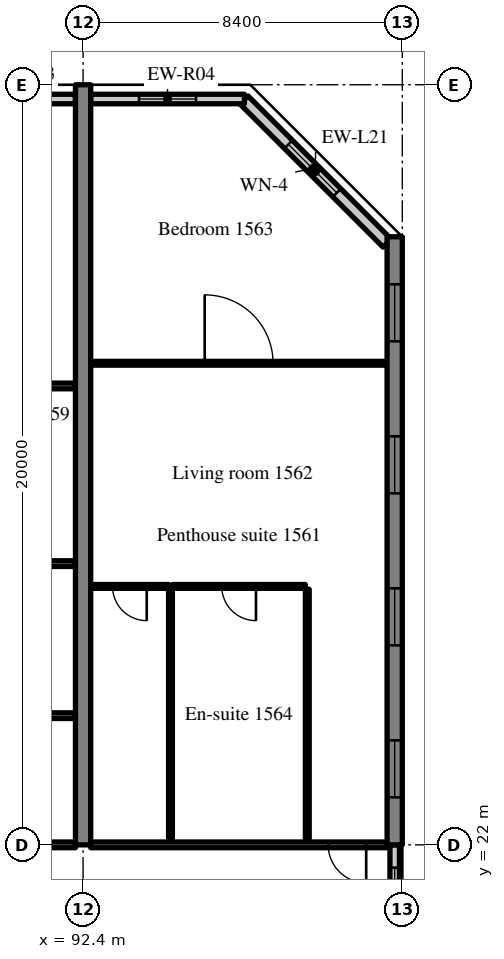
"""IFC4 building model, lengths in metres.
Left out: names, types, materials, properties, quantities, classifications, styles, units other than length and angle.
Written with IfcOpenShell. Run it as: python <this file> out.ifc"""

import sys

from ifc_helpers import new_model, si_unit, direction, frame, frame_2d, origin, place, context, subcontext, project, spatial, rectangle, extrude, source, transform, mapped, element, fill, save


model = new_model("IFC4")
c1 = context("Model", 3, precision=1e-05, world=origin(), true_north=direction((0.0, 1.0)))
c2 = subcontext(c1, "Body", "Model", "MODEL_VIEW")
j1 = project(units=[si_unit("LENGTHUNIT", "METRE"), si_unit("PLANEANGLEUNIT", "RADIAN")], contexts=[c1])
p1 = place(None, origin())
s1 = spatial("IfcSite", under=j1, at=p1, CompositionType="ELEMENT")
p2 = place(p1, origin())
s2 = spatial("IfcBuilding", under=s1, at=p2, CompositionType="ELEMENT")
p3 = place(p2, frame((0.0, 0.0, 65.8)))
s3 = spatial("IfcBuildingStorey", under=s2, at=p3, CompositionType="ELEMENT", Elevation=65.8)
m1 = source(origin(), c2, "Body", "SweptSolid", [
    extrude(rectangle(XDim=20.0, YDim=0.4, at=frame_2d((10.0, 0.0))), origin(), (0.0, 0.0, 1.0), 3.52),
])
p4 = place(p3, frame((92.4, 22.0, 0.0), z_axis=(0.0, 0.0, 1.0), x_axis=(0.0, 1.0, 0.0)))
e1 = element("IfcWall", 1, at=p4, inside=s3, PredefinedType="SHEAR", context=c2, shape_type="MappedRepresentation", body=[
    mapped(m1, transform((0.0, 0.0, 0.0), scale=1.0)),
])
m2 = source(origin(), c2, "Body", "SweptSolid", [
    extrude(rectangle(XDim=16.0, YDim=0.4, at=frame_2d((8.0, 0.0))), origin(), (0.0, 0.0, 1.0), 3.52),
])
p5 = place(p3, frame((100.6, 22.0, 0.0), z_axis=(0.0, 0.0, 1.0), x_axis=(0.0, 1.0, 0.0)))
e2 = element("IfcWall", 2, at=p5, inside=s3, PredefinedType="SHEAR", context=c2, shape_type="MappedRepresentation", body=[
    mapped(m2, transform((0.0, 0.0, 0.0), scale=1.0)),
])
m3 = source(origin(), c2, "Body", "SweptSolid", [
    extrude(rectangle(XDim=1.5, YDim=1.5, at=frame_2d((0.75, 0.75))), frame((0.0, 0.21, 0.0), z_axis=(0.0, -1.0, 0.0), x_axis=(1.0, 0.0, 0.0)), (0.0, 0.0, 1.0), 0.42),
])
p6 = place(p5, frame((1.25, 0.0, 0.9)))
e3 = element("IfcOpeningElement", 3, at=p6, cuts=e2, PredefinedType="OPENING", context=c2, shape_type="MappedRepresentation", body=[
    mapped(m3, transform((0.0, 0.0, 0.0), scale=1.0)),
])
p7 = place(p5, frame((5.25, 0.0, 0.9)))
e4 = element("IfcOpeningElement", 4, at=p7, cuts=e2, PredefinedType="OPENING", context=c2, shape_type="MappedRepresentation", body=[
    mapped(m3, transform((0.0, 0.0, 0.0), scale=1.0)),
])
p8 = place(p5, frame((9.25, 0.0, 0.9)))
e5 = element("IfcOpeningElement", 5, at=p8, cuts=e2, PredefinedType="OPENING", context=c2, shape_type="MappedRepresentation", body=[
    mapped(m3, transform((0.0, 0.0, 0.0), scale=1.0)),
])
p9 = place(p5, frame((13.25, 0.0, 0.9)))
e6 = element("IfcOpeningElement", 6, at=p9, cuts=e2, PredefinedType="OPENING", context=c2, shape_type="MappedRepresentation", body=[
    mapped(m3, transform((0.0, 0.0, 0.0), scale=1.0)),
])
m4 = source(origin(), c2, "Body", "SweptSolid", [
    extrude(rectangle(XDim=5.326, YDim=0.3, at=frame_2d((2.663, 0.0))), origin(), (0.0, 0.0, 1.0), 3.52),
])
p10 = place(p3, frame((100.4, 37.834, 0.0), z_axis=(0.0, 0.0, 1.0), x_axis=(-0.707083859269, 0.707129702361, 0.0)))
e7 = element("IfcWall", 7, at=p10, inside=s3, PredefinedType="SOLIDWALL", context=c2, shape_type="MappedRepresentation", body=[
    mapped(m4, transform((0.0, 0.0, 0.0), scale=1.0)),
])
m5 = source(origin(), c2, "Body", "SweptSolid", [
    extrude(rectangle(XDim=1.8, YDim=1.5, at=frame_2d((0.9, 0.75))), frame((0.0, 0.16, 0.0), z_axis=(0.0, -1.0, 0.0), x_axis=(1.0, 0.0, 0.0)), (0.0, 0.0, 1.0), 0.32),
])
p11 = place(p10, frame((1.871, 0.0, 0.9)))
e8 = element("IfcOpeningElement", 8, at=p11, cuts=e7, PredefinedType="OPENING", context=c2, shape_type="MappedRepresentation", body=[
    mapped(m5, transform((0.0, 0.0, 0.0), scale=1.0)),
])
m6 = source(origin(), c2, "Body", "SweptSolid", [
    extrude(rectangle(XDim=3.6, YDim=0.25, at=frame_2d((1.8, 0.0))), origin(), (0.0, 0.0, 1.0), 2.82),
])
p12 = place(p3, frame((92.2, 41.625, 0.0), z_axis=(0.0, 0.0, 1.0), x_axis=(-1.0, 0.0, 0.0)))
e9 = element("IfcWall", 9, at=p12, inside=s3, PredefinedType="SOLIDWALL", context=c2, shape_type="MappedRepresentation", body=[
    mapped(m6, transform((0.0, 0.0, 0.0), scale=1.0)),
])
m7 = source(origin(), c2, "Body", "SweptSolid", [
    extrude(rectangle(XDim=1.5, YDim=1.5, at=frame_2d((0.75, 0.75))), frame((0.0, 0.135, 0.0), z_axis=(0.0, -1.0, 0.0), x_axis=(1.0, 0.0, 0.0)), (0.0, 0.0, 1.0), 0.27),
])
p13 = place(p12, frame((1.05, 0.0, 0.9)))
e10 = element("IfcOpeningElement", 10, at=p13, cuts=e9, PredefinedType="OPENING", context=c2, shape_type="MappedRepresentation", body=[
    mapped(m7, transform((0.0, 0.0, 0.0), scale=1.0)),
])
m8 = source(origin(), c2, "Body", "SweptSolid", [
    extrude(rectangle(XDim=4.045, YDim=0.25, at=frame_2d((2.022, 0.0))), origin(), (0.0, 0.0, 1.0), 2.82),
])
p14 = place(p3, frame((96.645, 41.625, 0.0), z_axis=(0.0, 0.0, 1.0), x_axis=(-1.0, 0.0, 0.0)))
e11 = element("IfcWall", 11, at=p14, inside=s3, PredefinedType="SOLIDWALL", context=c2, shape_type="MappedRepresentation", body=[
    mapped(m8, transform((0.0, 0.0, 0.0), scale=1.0)),
])
p15 = place(p14, frame((1.272, 0.0, 0.9)))
e12 = element("IfcOpeningElement", 12, at=p15, cuts=e11, PredefinedType="OPENING", context=c2, shape_type="MappedRepresentation", body=[
    mapped(m7, transform((0.0, 0.0, 0.0), scale=1.0)),
])
m9 = source(origin(), c2, "Body", "SweptSolid", [
    extrude(rectangle(XDim=2.4, YDim=0.25, at=frame_2d((1.2, 0.0))), origin(), (0.0, 0.0, 1.0), 2.62),
])
p16 = place(p3, frame((100.6, 19.6, 0.0), z_axis=(0.0, 0.0, 1.0), x_axis=(0.0, 1.0, 0.0)))
e13 = element("IfcWall", 13, at=p16, inside=s3, PredefinedType="SOLIDWALL", context=c2, shape_type="MappedRepresentation", body=[
    mapped(m9, transform((0.0, 0.0, 0.0), scale=1.0)),
])
m10 = source(origin(), c2, "Body", "SweptSolid", [
    extrude(rectangle(XDim=1.2, YDim=1.5, at=frame_2d((0.6, 0.75))), frame((0.0, 0.135, 0.0), z_axis=(0.0, -1.0, 0.0), x_axis=(1.0, 0.0, 0.0)), (0.0, 0.0, 1.0), 0.27),
])
p17 = place(p16, frame((0.6, 0.0, 0.9)))
e14 = element("IfcOpeningElement", 14, at=p17, cuts=e13, PredefinedType="OPENING", context=c2, shape_type="MappedRepresentation", body=[
    mapped(m10, transform((0.0, 0.0, 0.0), scale=1.0)),
])
m11 = source(origin(), c2, "Body", "SweptSolid", [
    extrude(rectangle(XDim=5.45, YDim=0.15, at=frame_2d((2.725, 0.0))), origin(), (0.0, 0.0, 1.0), 2.82),
])
p18 = place(p3, frame((86.75, 22.0, 0.0), z_axis=(0.0, 0.0, 1.0), x_axis=(1.0, 0.0, 0.0)))
e15 = element("IfcWall", 15, at=p18, inside=s3, PredefinedType="PARTITIONING", context=c2, shape_type="MappedRepresentation", body=[
    mapped(m11, transform((0.0, 0.0, 0.0), scale=1.0)),
])
m12 = source(origin(), c2, "Body", "SweptSolid", [
    extrude(rectangle(XDim=5.45, YDim=0.15, at=frame_2d((2.725, 0.0))), origin(), (0.0, 0.0, 1.0), 3.52),
])
for number, where, z_axis, x_axis in (
    (16, (86.75, 25.4, 0.0), (0.0, 0.0, 1.0), (1.0, 0.0, 0.0)),
    (17, (86.75, 29.4, 0.0), (0.0, 0.0, 1.0), (1.0, 0.0, 0.0)),
):
    element("IfcWall", number, at=place(p3, frame(where, z_axis=z_axis, x_axis=x_axis)), inside=s3, PredefinedType="PARTITIONING", context=c2, shape_type="MappedRepresentation", body=[
        mapped(m12, transform((0.0, 0.0, 0.0), scale=1.0)),
    ])
m13 = source(origin(), c2, "Body", "SweptSolid", [
    extrude(rectangle(XDim=8.0, YDim=0.15, at=frame_2d((4.0, 0.0))), origin(), (0.0, 0.0, 1.0), 3.52),
])
p19 = place(p3, frame((84.2, 34.075, 0.0), z_axis=(0.0, 0.0, 1.0), x_axis=(1.0, 0.0, 0.0)))
e18 = element("IfcWall", 18, at=p19, inside=s3, PredefinedType="PARTITIONING", context=c2, shape_type="MappedRepresentation", body=[
    mapped(m13, transform((0.0, 0.0, 0.0), scale=1.0)),
])
m14 = source(origin(), c2, "Body", "SweptSolid", [
    extrude(rectangle(XDim=1.0, YDim=2.1, at=frame_2d((0.5, 1.05))), frame((0.0, 0.085, 0.0), z_axis=(0.0, -1.0, 0.0), x_axis=(1.0, 0.0, 0.0)), (0.0, 0.0, 1.0), 0.17),
])
p20 = place(p19, frame((0.7, 0.0, 0.0)))
e19 = element("IfcOpeningElement", 19, at=p20, cuts=e18, PredefinedType="OPENING", context=c2, shape_type="MappedRepresentation", body=[
    mapped(m14, transform((0.0, 0.0, 0.0), scale=1.0)),
])
m15 = source(origin(), c2, "Body", "SweptSolid", [
    extrude(rectangle(XDim=6.65, YDim=0.1, at=frame_2d((3.325, 0.0))), origin(), (0.0, 0.0, 1.0), 3.52),
])
for number, where, z_axis, x_axis in (
    (20, (98.3, 22.075, 0.0), (0.0, 0.0, 1.0), (0.0, 1.0, 0.0)),
    (21, (94.7, 22.075, 0.0), (0.0, 0.0, 1.0), (0.0, 1.0, 0.0)),
):
    element("IfcWall", number, at=place(p3, frame(where, z_axis=z_axis, x_axis=x_axis)), inside=s3, PredefinedType="PARTITIONING", context=c2, shape_type="MappedRepresentation", body=[
        mapped(m15, transform((0.0, 0.0, 0.0), scale=1.0)),
    ])
m16 = source(origin(), c2, "Body", "SweptSolid", [
    extrude(rectangle(XDim=3.5, YDim=0.1, at=frame_2d((1.75, 0.0))), origin(), (0.0, 0.0, 1.0), 3.52),
])
p21 = place(p3, frame((94.75, 28.8, 0.0), z_axis=(0.0, 0.0, 1.0), x_axis=(1.0, 0.0, 0.0)))
e22 = element("IfcWall", 22, at=p21, inside=s3, PredefinedType="PARTITIONING", context=c2, shape_type="MappedRepresentation", body=[
    mapped(m16, transform((0.0, 0.0, 0.0), scale=1.0)),
])
m17 = source(origin(), c2, "Body", "SweptSolid", [
    extrude(rectangle(XDim=0.9, YDim=2.1, at=frame_2d((0.45, 1.05))), frame((0.0, 0.06, 0.0), z_axis=(0.0, -1.0, 0.0), x_axis=(1.0, 0.0, 0.0)), (0.0, 0.0, 1.0), 0.12),
])
p22 = place(p21, frame((1.3, 0.0, 0.0)))
e23 = element("IfcOpeningElement", 23, at=p22, cuts=e22, PredefinedType="OPENING", context=c2, shape_type="MappedRepresentation", body=[
    mapped(m17, transform((0.0, 0.0, 0.0), scale=1.0)),
])
m18 = source(origin(), c2, "Body", "SweptSolid", [
    extrude(rectangle(XDim=2.05, YDim=0.1, at=frame_2d((1.025, 0.0))), origin(), (0.0, 0.0, 1.0), 3.52),
])
p23 = place(p3, frame((92.6, 28.8, 0.0), z_axis=(0.0, 0.0, 1.0), x_axis=(1.0, 0.0, 0.0)))
e24 = element("IfcWall", 24, at=p23, inside=s3, PredefinedType="PARTITIONING", context=c2, shape_type="MappedRepresentation", body=[
    mapped(m18, transform((0.0, 0.0, 0.0), scale=1.0)),
])
p24 = place(p23, frame((0.575, 0.0, 0.0)))
e25 = element("IfcOpeningElement", 25, at=p24, cuts=e24, PredefinedType="OPENING", context=c2, shape_type="MappedRepresentation", body=[
    mapped(m17, transform((0.0, 0.0, 0.0), scale=1.0)),
])
m19 = source(origin(), c2, "Body", "SweptSolid", [
    extrude(rectangle(XDim=7.8, YDim=0.1, at=frame_2d((3.9, 0.0))), origin(), (0.0, 0.0, 1.0), 3.52),
])
p25 = place(p3, frame((92.6, 34.672, 0.0), z_axis=(0.0, 0.0, 1.0), x_axis=(1.0, 0.0, 0.0)))
e26 = element("IfcWall", 26, at=p25, inside=s3, PredefinedType="PARTITIONING", context=c2, shape_type="MappedRepresentation", body=[
    mapped(m19, transform((0.0, 0.0, 0.0), scale=1.0)),
])
m20 = source(origin(), c2, "Body", "SweptSolid", [
    extrude(rectangle(XDim=1.8, YDim=2.1, at=frame_2d((0.9, 1.05))), frame((0.0, 0.06, 0.0), z_axis=(0.0, -1.0, 0.0), x_axis=(1.0, 0.0, 0.0)), (0.0, 0.0, 1.0), 0.12),
])
p26 = place(p25, frame((3.0, 0.0, 0.0)))
e27 = element("IfcOpeningElement", 27, at=p26, cuts=e26, PredefinedType="OPENING", context=c2, shape_type="MappedRepresentation", body=[
    mapped(m20, transform((0.0, 0.0, 0.0), scale=1.0)),
])
m21 = source(origin(), c2, "Body", "SweptSolid", [
    extrude(rectangle(XDim=7.8, YDim=0.15, at=frame_2d((3.9, 0.0))), origin(), (0.0, 0.0, 1.0), 2.82),
])
p27 = place(p3, frame((92.6, 22.0, 0.0), z_axis=(0.0, 0.0, 1.0), x_axis=(1.0, 0.0, 0.0)))
e28 = element("IfcWall", 28, at=p27, inside=s3, PredefinedType="PARTITIONING", context=c2, shape_type="MappedRepresentation", body=[
    mapped(m21, transform((0.0, 0.0, 0.0), scale=1.0)),
])
p28 = place(p27, frame((6.25, 0.0, 0.0)))
e29 = element("IfcOpeningElement", 29, at=p28, cuts=e28, PredefinedType="OPENING", context=c2, shape_type="MappedRepresentation", body=[
    mapped(m14, transform((0.0, 0.0, 0.0), scale=1.0)),
])
m22 = source(origin(), c2, "Body", "SweptSolid", [
    extrude(rectangle(XDim=1.8, YDim=1.5, at=frame_2d((0.9, 0.75))), frame((0.0, 0.03, 0.0), z_axis=(0.0, -1.0, 0.0), x_axis=(1.0, 0.0, 0.0)), (0.0, 0.0, 1.0), 0.06),
])
p29 = place(p11, origin())
e30 = element("IfcWindow", 30, at=p29, inside=s3, PartitioningType="SINGLE_PANEL", PredefinedType="WINDOW", context=c2, shape_type="MappedRepresentation", body=[
    mapped(m22, transform((0.0, 0.0, 0.0), scale=1.0)),
])
fill(e8, e30)
m23 = source(origin(), c2, "Body", "SweptSolid", [
    extrude(rectangle(XDim=1.5, YDim=1.5, at=frame_2d((0.75, 0.75))), frame((0.0, 0.03, 0.0), z_axis=(0.0, -1.0, 0.0), x_axis=(1.0, 0.0, 0.0)), (0.0, 0.0, 1.0), 0.06),
])
p30 = place(p15, origin())
e31 = element("IfcWindow", 31, at=p30, inside=s3, PartitioningType="SINGLE_PANEL", PredefinedType="WINDOW", context=c2, shape_type="MappedRepresentation", body=[
    mapped(m23, transform((0.0, 0.0, 0.0), scale=1.0)),
])
fill(e12, e31)
p31 = place(p6, origin())
e32 = element("IfcWindow", 32, at=p31, inside=s3, PartitioningType="SINGLE_PANEL", PredefinedType="WINDOW", context=c2, shape_type="MappedRepresentation", body=[
    mapped(m23, transform((0.0, 0.0, 0.0), scale=1.0)),
])
fill(e3, e32)
p32 = place(p7, origin())
e33 = element("IfcWindow", 33, at=p32, inside=s3, PartitioningType="SINGLE_PANEL", PredefinedType="WINDOW", context=c2, shape_type="MappedRepresentation", body=[
    mapped(m23, transform((0.0, 0.0, 0.0), scale=1.0)),
])
fill(e4, e33)
p33 = place(p8, origin())
e34 = element("IfcWindow", 34, at=p33, inside=s3, PartitioningType="SINGLE_PANEL", PredefinedType="WINDOW", context=c2, shape_type="MappedRepresentation", body=[
    mapped(m23, transform((0.0, 0.0, 0.0), scale=1.0)),
])
fill(e5, e34)
p34 = place(p9, origin())
e35 = element("IfcWindow", 35, at=p34, inside=s3, PartitioningType="SINGLE_PANEL", PredefinedType="WINDOW", context=c2, shape_type="MappedRepresentation", body=[
    mapped(m23, transform((0.0, 0.0, 0.0), scale=1.0)),
])
fill(e6, e35)
m24 = source(origin(), c2, "Body", "SweptSolid", [
    extrude(rectangle(XDim=1.2, YDim=1.5, at=frame_2d((0.6, 0.75))), frame((0.0, 0.03, 0.0), z_axis=(0.0, -1.0, 0.0), x_axis=(1.0, 0.0, 0.0)), (0.0, 0.0, 1.0), 0.06),
])
p35 = place(p17, origin())
e36 = element("IfcWindow", 36, at=p35, inside=s3, PartitioningType="SINGLE_PANEL", PredefinedType="WINDOW", context=c2, shape_type="MappedRepresentation", body=[
    mapped(m24, transform((0.0, 0.0, 0.0), scale=1.0)),
])
fill(e14, e36)
m25 = source(origin(), c2, "Body", "SweptSolid", [
    extrude(rectangle(XDim=0.9, YDim=2.1, at=frame_2d((0.45, 1.05))), frame((0.0, 0.025, 0.0), z_axis=(0.0, -1.0, 0.0), x_axis=(1.0, 0.0, 0.0)), (0.0, 0.0, 1.0), 0.05),
])
p36 = place(p22, origin())
e37 = element("IfcDoor", 37, at=p36, inside=s3, OperationType="SINGLE_SWING_RIGHT", PredefinedType="DOOR", context=c2, shape_type="MappedRepresentation", body=[
    mapped(m25, transform((0.0, 0.0, 0.0), scale=1.0)),
])
fill(e23, e37)
p37 = place(p24, origin())
e38 = element("IfcDoor", 38, at=p37, inside=s3, OperationType="SINGLE_SWING_RIGHT", PredefinedType="DOOR", context=c2, shape_type="MappedRepresentation", body=[
    mapped(m25, transform((0.0, 0.0, 0.0), scale=1.0)),
])
fill(e25, e38)
m26 = source(origin(), c2, "Body", "SweptSolid", [
    extrude(rectangle(XDim=1.8, YDim=2.1, at=frame_2d((0.9, 1.05))), frame((0.0, 0.025, 0.0), z_axis=(0.0, -1.0, 0.0), x_axis=(1.0, 0.0, 0.0)), (0.0, 0.0, 1.0), 0.05),
])
p38 = place(p26, origin())
e39 = element("IfcDoor", 39, at=p38, inside=s3, OperationType="DOUBLE_DOOR_SINGLE_SWING", PredefinedType="DOOR", context=c2, shape_type="MappedRepresentation", body=[
    mapped(m26, transform((0.0, 0.0, 0.0), scale=1.0)),
])
fill(e27, e39)
m27 = source(origin(), c2, "Body", "SweptSolid", [
    extrude(rectangle(XDim=1.0, YDim=2.1, at=frame_2d((0.5, 1.05))), frame((0.0, 0.025, 0.0), z_axis=(0.0, -1.0, 0.0), x_axis=(1.0, 0.0, 0.0)), (0.0, 0.0, 1.0), 0.05),
])
p39 = place(p28, origin())
e40 = element("IfcDoor", 40, at=p39, inside=s3, OperationType="SINGLE_SWING_RIGHT", PredefinedType="DOOR", context=c2, shape_type="MappedRepresentation", body=[
    mapped(m27, transform((0.0, 0.0, 0.0), scale=1.0)),
])
fill(e29, e40)
save(model, sys.argv[1])
